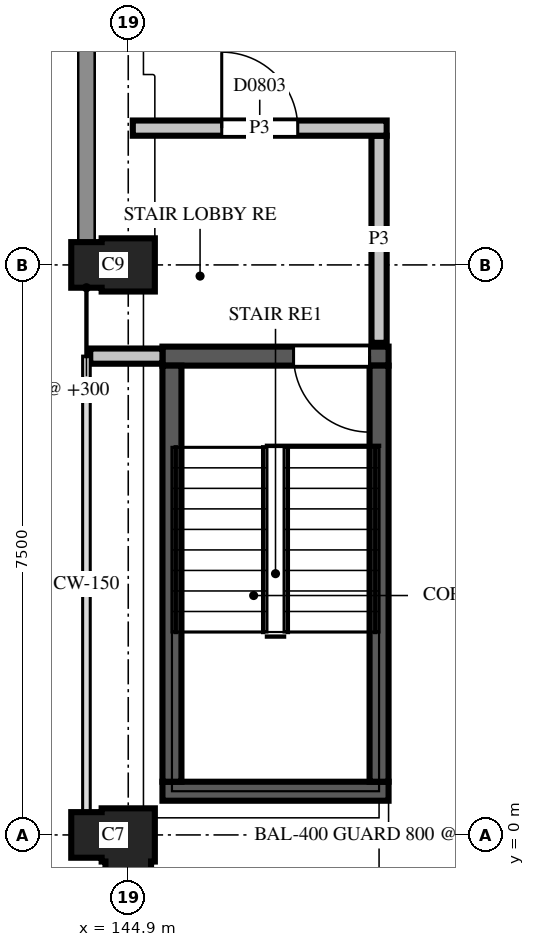
"""IFC4 building model, lengths in metres.
Left out: names, types, materials, properties, quantities, classifications, styles, units other than length and angle.
Written with IfcOpenShell. Run it as: python <this file> out.ifc"""

import sys

from ifc_helpers import new_model, si_unit, direction, frame, frame_2d, origin, place, context, subcontext, project, spatial, polyline, rectangle, outline, extrude, element, fill, save


model = new_model("IFC4")
c1 = context("Model", 3, precision=1e-05, world=origin(), true_north=direction((0.0, 1.0)))
c2 = subcontext(c1, "Body", "Model", "MODEL_VIEW")
j1 = project(units=[si_unit("LENGTHUNIT", "METRE"), si_unit("PLANEANGLEUNIT", "RADIAN")], contexts=[c1])
p1 = place(None, origin())
s1 = spatial("IfcSite", under=j1, at=p1, CompositionType="ELEMENT")
p2 = place(p1, origin())
s2 = spatial("IfcBuilding", under=s1, at=p2, CompositionType="ELEMENT")
p3 = place(p2, frame((0.0, 0.0, 30.4)))
s3 = spatial("IfcBuildingStorey", under=s2, at=p3, CompositionType="ELEMENT", Elevation=30.4)
p4 = place(p3, frame((144.9, 0.0, 0.0), z_axis=(0.0, 0.0, 1.0), x_axis=(-1.0, 0.0, 0.0)))
e1 = element("IfcColumn", 1, at=p4, inside=s3, PredefinedType="COLUMN", context=c2, shape_type="SweptSolid", body=[
    extrude(outline(polyline([(-0.35, -0.35), (0.35, -0.35), (0.35, -0.3), (0.75, -0.3), (0.75, 0.3), (0.35, 0.3), (0.35, 0.35), (0.3, 0.35), (0.3, 0.75), (-0.3, 0.75), (-0.3, 0.35), (-0.35, 0.35), (-0.35, -0.35)])), origin(), (0.0, 0.0, 1.0), 3.7),
])
p5 = place(p3, frame((144.9, 7.5, 0.0), z_axis=(0.0, 0.0, 1.0), x_axis=(-1.0, 0.0, 0.0)))
e2 = element("IfcColumn", 2, at=p5, inside=s3, PredefinedType="COLUMN", context=c2, shape_type="SweptSolid", body=[
    extrude(outline(polyline([(-0.35, -0.35), (0.35, -0.35), (0.35, -0.3), (0.75, -0.3), (0.75, 0.3), (0.35, 0.3), (0.35, 0.35), (-0.35, 0.35), (-0.35, -0.35)])), origin(), (0.0, 0.0, 1.0), 3.7),
])
p6 = place(p3, frame((145.35, 0.575, 0.0), z_axis=(0.0, 0.0, 1.0), x_axis=(1.0, 0.0, 0.0)))
e3 = element("IfcWall", 3, at=p6, inside=s3, PredefinedType="SHEAR", context=c2, shape_type="SweptSolid", body=[
    extrude(rectangle(XDim=2.975, YDim=0.25, at=frame_2d((1.487, 0.0))), origin(), (0.0, 0.0, 1.0), 3.7),
])
p7 = place(p3, frame((145.35, 6.3, 0.0), z_axis=(0.0, 0.0, 1.0), x_axis=(1.0, 0.0, 0.0)))
e4 = element("IfcWall", 4, at=p7, inside=s3, PredefinedType="SHEAR", context=c2, shape_type="SweptSolid", body=[
    extrude(rectangle(XDim=2.975, YDim=0.25, at=frame_2d((1.487, 0.0))), origin(), (0.0, 0.0, 1.0), 3.7),
])
p8 = place(p7, frame((1.725, 0.0, 0.0)))
e5 = element("IfcOpeningElement", 5, at=p8, cuts=e4, PredefinedType="OPENING", context=c2, shape_type="SweptSolid", body=[
    extrude(rectangle(XDim=1.0, YDim=2.1, at=frame_2d((0.5, 1.05))), frame((0.0, 0.135, 0.0), z_axis=(0.0, -1.0, 0.0), x_axis=(1.0, 0.0, 0.0)), (0.0, 0.0, 1.0), 0.27),
])
for number, where, z_axis, x_axis in (
    (6, (145.475, 0.7, 0.0), (0.0, 0.0, 1.0), (0.0, 1.0, 0.0)),
    (7, (148.2, 0.7, 0.0), (0.0, 0.0, 1.0), (0.0, 1.0, 0.0)),
):
    element("IfcWall", number, at=place(p3, frame(where, z_axis=z_axis, x_axis=x_axis)), inside=s3, PredefinedType="SHEAR", context=c2, shape_type="SweptSolid", body=[
        extrude(rectangle(XDim=5.475, YDim=0.25, at=frame_2d((2.738, 0.0))), origin(), (0.0, 0.0, 1.0), 3.7),
    ])
p9 = place(p3, frame((144.4, 6.3, 0.0), z_axis=(0.0, 0.0, 1.0), x_axis=(1.0, 0.0, 0.0)))
e8 = element("IfcWall", 8, at=p9, inside=s3, PredefinedType="PARTITIONING", context=c2, shape_type="SweptSolid", body=[
    extrude(rectangle(XDim=0.95, YDim=0.2, at=frame_2d((0.475, 0.0))), origin(), (0.0, 0.0, 1.0), 2.88),
])
p10 = place(p3, frame((148.2, 6.475, 0.0), z_axis=(0.0, 0.0, 1.0), x_axis=(0.0, 1.0, 0.0)))
e9 = element("IfcWall", 9, at=p10, inside=s3, PredefinedType="PARTITIONING", context=c2, shape_type="SweptSolid", body=[
    extrude(rectangle(XDim=2.725, YDim=0.2, at=frame_2d((1.362, 0.0))), origin(), (0.0, 0.0, 1.0), 2.88),
])
p11 = place(p3, frame((148.3, 9.3, 0.0), z_axis=(0.0, 0.0, 1.0), x_axis=(-1.0, 0.0, 0.0)))
e10 = element("IfcWall", 10, at=p11, inside=s3, PredefinedType="PARTITIONING", context=c2, shape_type="SweptSolid", body=[
    extrude(rectangle(XDim=3.34, YDim=0.2, at=frame_2d((1.67, 0.0))), origin(), (0.0, 0.0, 1.0), 2.88),
])
p12 = place(p11, frame((1.17, 0.0, 0.0)))
e11 = element("IfcOpeningElement", 11, at=p12, cuts=e10, PredefinedType="OPENING", context=c2, shape_type="SweptSolid", body=[
    extrude(rectangle(XDim=1.0, YDim=2.1, at=frame_2d((0.5, 1.05))), frame((0.0, 0.11, 0.0), z_axis=(0.0, -1.0, 0.0), x_axis=(1.0, 0.0, 0.0)), (0.0, 0.0, 1.0), 0.22),
])
p13 = place(p12, origin())
e12 = element("IfcDoor", 12, at=p13, inside=s3, OperationType="SINGLE_SWING_RIGHT", PredefinedType="DOOR", context=c2, shape_type="SweptSolid", body=[
    extrude(rectangle(XDim=1.0, YDim=2.1, at=frame_2d((0.5, 1.05))), frame((0.0, 0.025, 0.0), z_axis=(0.0, -1.0, 0.0), x_axis=(1.0, 0.0, 0.0)), (0.0, 0.0, 1.0), 0.05),
])
fill(e11, e12)
p14 = place(p8, origin())
e13 = element("IfcDoor", 13, at=p14, inside=s3, OperationType="SINGLE_SWING_RIGHT", PredefinedType="DOOR", context=c2, shape_type="SweptSolid", body=[
    extrude(rectangle(XDim=1.0, YDim=2.1, at=frame_2d((0.5, 1.05))), frame((0.0, 0.025, 0.0), z_axis=(0.0, -1.0, 0.0), x_axis=(1.0, 0.0, 0.0)), (0.0, 0.0, 1.0), 0.05),
])
fill(e5, e13)
save(model, sys.argv[1])
